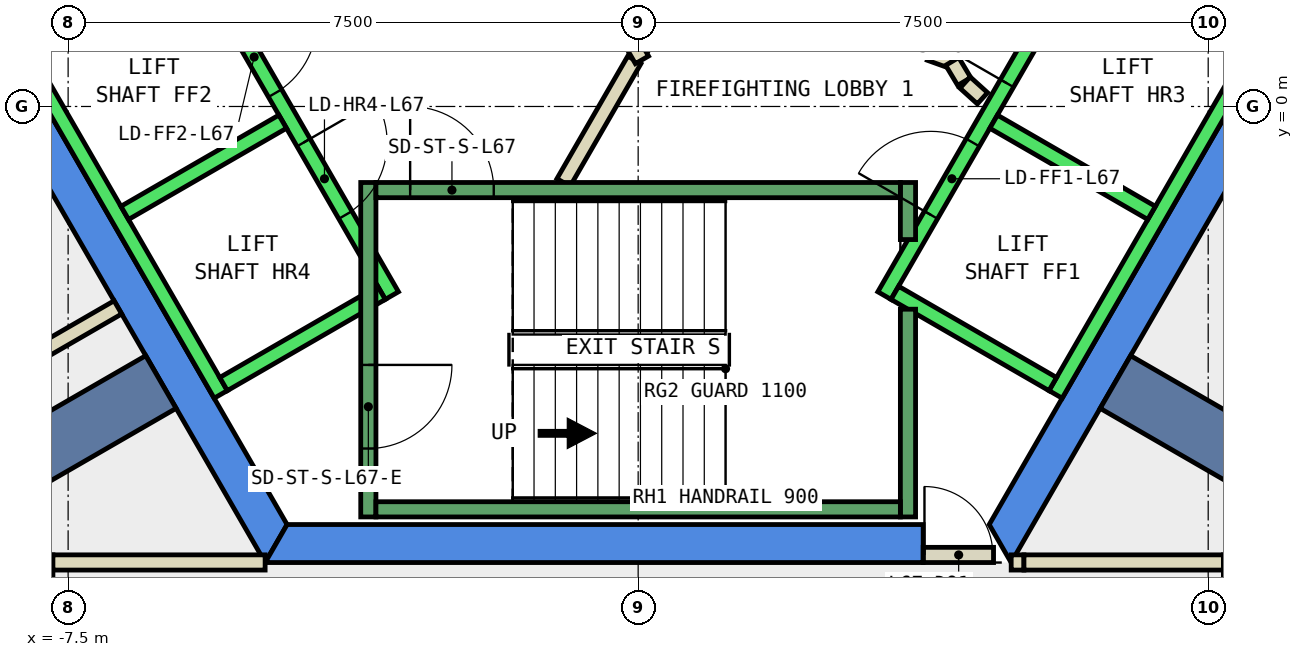
"""IFC4 building model, lengths in metres.
Left out: names, types, materials, properties, quantities, classifications, styles, units other than length and angle.
Written with IfcOpenShell. Run it as: python <this file> out.ifc"""

import sys

from ifc_helpers import new_model, si_unit, direction, frame, frame_2d, origin, place, context, subcontext, project, spatial, polyline, rectangle, outline, extrude, element, fill, save


model = new_model("IFC4")
c1 = context("Model", 3, precision=1e-05, world=origin(), true_north=direction((0.0, 1.0)))
c2 = subcontext(c1, "Body", "Model", "MODEL_VIEW")
j1 = project(units=[si_unit("LENGTHUNIT", "METRE"), si_unit("PLANEANGLEUNIT", "RADIAN")], contexts=[c1])
p1 = place(None, origin())
s1 = spatial("IfcSite", under=j1, at=p1, CompositionType="ELEMENT")
p2 = place(p1, origin())
s2 = spatial("IfcBuilding", under=s1, at=p2, CompositionType="ELEMENT")
p3 = place(p2, frame((0.0, 0.0, 290.0)))
s3 = spatial("IfcBuildingStorey", under=s2, at=p3, CompositionType="ELEMENT", Elevation=290.0)
p4 = place(p3, frame((0.0, 0.0, -0.34)))
e1 = element("IfcWall", 1, at=p4, inside=s3, PredefinedType="SHEAR", context=c2, shape_type="SweptSolid", body=[
    extrude(outline(polyline([(-9.815, 2.5), (-4.907, -6.0), (-4.619, -5.5), (-9.238, 2.5), (-9.815, 2.5)])), origin(), (0.0, 0.0, 1.0), 3.6),
])
p5 = place(p3, frame((0.0, 0.0, -0.34)))
e2 = element("IfcWall", 2, at=p5, inside=s3, PredefinedType="SHEAR", context=c2, shape_type="SweptSolid", body=[
    extrude(outline(polyline([(3.75, -6.0), (3.75, -5.5), (-4.619, -5.5), (-4.907, -6.0), (3.75, -6.0)])), origin(), (0.0, 0.0, 1.0), 3.6),
])
p6 = place(p3, frame((0.0, 0.0, -0.34)))
e3 = element("IfcWall", 3, at=p6, inside=s3, PredefinedType="SHEAR", context=c2, shape_type="SweptSolid", body=[
    extrude(outline(polyline([(4.907, -6.0), (9.815, 2.5), (9.238, 2.5), (4.619, -5.5), (4.907, -6.0)])), origin(), (0.0, 0.0, 1.0), 3.6),
])
for number, where, z_axis, x_axis in (
    (4, (6.279, -3.625, -0.34), (0.0, 0.0, 1.0), (0.866, -0.5, 0.0)),
    (5, (-6.279, -3.625, -0.34), (0.0, 0.0, 1.0), (-0.866, -0.5, 0.0)),
):
    element("IfcWall", number, at=place(p3, frame(where, z_axis=z_axis, x_axis=x_axis)), inside=s3, PredefinedType="SHEAR", context=c2, shape_type="SweptSolid", body=[
        extrude(rectangle(XDim=9.0, YDim=0.8, at=frame_2d((4.5, 0.0))), origin(), (0.0, 0.0, 1.0), 3.6),
    ])
p7 = place(p3, frame((-0.982, -1.0, 0.0), z_axis=(0.0, 0.0, 1.0), x_axis=(0.50024047865, 0.865886518847, 0.0)))
e6 = element("IfcWall", 6, at=p7, inside=s3, PredefinedType="PARTITIONING", context=c2, shape_type="SweptSolid", body=[
    extrude(rectangle(XDim=1.863, YDim=0.2, at=frame_2d((0.931, 0.0))), origin(), (0.0, 0.0, 1.0), 3.26),
])
p8 = place(p3, frame((3.838, 0.702, 0.0), z_axis=(0.0, 0.0, 1.0), x_axis=(0.941035081519, -0.338308993895, 0.0)))
e7 = element("IfcWall", 7, at=p8, inside=s3, PredefinedType="PARTITIONING", context=c2, shape_type="SweptSolid", body=[
    extrude(rectangle(XDim=0.337, YDim=0.2, at=frame_2d((0.168, 0.0))), origin(), (0.0, 0.0, 1.0), 3.26),
])
p9 = place(p3, frame((4.132, 0.593, 0.0), z_axis=(0.0, 0.0, 1.0), x_axis=(0.513561617048, -0.858052717201, 0.0)))
e8 = element("IfcWall", 8, at=p9, inside=s3, PredefinedType="PARTITIONING", context=c2, shape_type="SweptSolid", body=[
    extrude(rectangle(XDim=0.308, YDim=0.2, at=frame_2d((0.154, 0.0))), origin(), (0.0, 0.0, 1.0), 3.26),
])
p10 = place(p3, frame((4.301, 0.315, 0.0), z_axis=(0.0, 0.0, 1.0), x_axis=(0.741798017506, -0.670623367639, 0.0)))
e9 = element("IfcWall", 9, at=p10, inside=s3, PredefinedType="PARTITIONING", context=c2, shape_type="SweptSolid", body=[
    extrude(rectangle(XDim=0.309, YDim=0.2, at=frame_2d((0.154, 0.0))), origin(), (0.0, 0.0, 1.0), 3.26),
])
p11 = place(p3, frame((-2.54, 5.1, 0.0), z_axis=(0.0, 0.0, 1.0), x_axis=(0.499925051871, -0.866068670783, 0.0)))
e10 = element("IfcWall", 10, at=p11, inside=s3, PredefinedType="PARTITIONING", context=c2, shape_type="SweptSolid", body=[
    extrude(rectangle(XDim=5.181, YDim=0.2, at=frame_2d((2.59, 0.0))), origin(), (0.0, 0.0, 1.0), 3.26),
])
p12 = place(p11, frame((2.04, 0.0, 0.0)))
e11 = element("IfcOpeningElement", 11, at=p12, cuts=e10, PredefinedType="OPENING", context=c2, shape_type="SweptSolid", body=[
    extrude(rectangle(XDim=1.0, YDim=2.1, at=frame_2d((0.5, 1.05))), frame((0.0, 0.11, 0.0), z_axis=(0.0, -1.0, 0.0), x_axis=(1.0, 0.0, 0.0)), (0.0, 0.0, 1.0), 0.22),
])
p13 = place(p3, frame((4.908, -5.999, 0.0), z_axis=(0.0, 0.0, 1.0), x_axis=(1.0, 0.0, 0.0)))
e12 = element("IfcWall", 12, at=p13, inside=s3, PredefinedType="PARTITIONING", context=c2, shape_type="SweptSolid", body=[
    extrude(rectangle(XDim=0.168, YDim=0.2, at=frame_2d((0.084, 0.0))), origin(), (0.0, 0.0, 1.0), 2.4),
])
p14 = place(p3, frame((7.8, -5.899, 0.0), z_axis=(0.0, 0.0, 1.0), x_axis=(0.0, -1.0, 0.0)))
e13 = element("IfcWall", 13, at=p14, inside=s3, PredefinedType="PARTITIONING", context=c2, shape_type="SweptSolid", body=[
    extrude(rectangle(XDim=3.876, YDim=0.2, at=frame_2d((1.938, 0.0))), origin(), (0.0, 0.0, 1.0), 3.26),
])
p15 = place(p3, frame((-7.8, -9.775, 0.0), z_axis=(0.0, 0.0, 1.0), x_axis=(0.0, 1.0, 0.0)))
e14 = element("IfcWall", 14, at=p15, inside=s3, PredefinedType="PARTITIONING", context=c2, shape_type="SweptSolid", body=[
    extrude(rectangle(XDim=3.876, YDim=0.2, at=frame_2d((1.938, 0.0))), origin(), (0.0, 0.0, 1.0), 3.26),
])
p16 = place(p15, frame((1.438, 0.0, 0.0)))
e15 = element("IfcOpeningElement", 15, at=p16, cuts=e14, PredefinedType="OPENING", context=c2, shape_type="SweptSolid", body=[
    extrude(rectangle(XDim=1.0, YDim=2.1, at=frame_2d((0.5, 1.05))), frame((0.0, 0.11, 0.0), z_axis=(0.0, -1.0, 0.0), x_axis=(1.0, 0.0, 0.0)), (0.0, 0.0, 1.0), 0.22),
])
p17 = place(p3, frame((-7.7, -5.999, 0.0), z_axis=(0.0, 0.0, 1.0), x_axis=(1.0, 0.0, 0.0)))
e16 = element("IfcWall", 16, at=p17, inside=s3, PredefinedType="PARTITIONING", context=c2, shape_type="SweptSolid", body=[
    extrude(rectangle(XDim=2.792, YDim=0.2, at=frame_2d((1.396, 0.0))), origin(), (0.0, 0.0, 1.0), 3.26),
])
p18 = place(p3, frame((-6.845, -2.643, 0.0), z_axis=(0.0, 0.0, 1.0), x_axis=(-0.865994457699, -0.500053596362, 0.0)))
e17 = element("IfcWall", 17, at=p18, inside=s3, PredefinedType="PARTITIONING", context=c2, shape_type="SweptSolid", body=[
    extrude(rectangle(XDim=6.701, YDim=0.2, at=frame_2d((3.351, 0.0))), origin(), (0.0, 0.0, 1.0), 3.26),
])
p19 = place(p3, frame((3.75, -5.9, 0.0), z_axis=(0.0, 0.0, 1.0), x_axis=(1.0, 0.0, 0.0)))
e18 = element("IfcWall", 18, at=p19, inside=s3, PredefinedType="PARTITIONING", context=c2, shape_type="SweptSolid", body=[
    extrude(rectangle(XDim=0.926, YDim=0.2, at=frame_2d((0.463, 0.0))), origin(), (0.0, 0.0, 1.0), 2.4),
])
p20 = place(p19, frame((0.017, 0.0, 0.0)))
e19 = element("IfcOpeningElement", 19, at=p20, cuts=e18, PredefinedType="OPENING", context=c2, shape_type="SweptSolid", body=[
    extrude(rectangle(XDim=0.9, YDim=2.1, at=frame_2d((0.45, 1.05))), frame((0.0, 0.11, 0.0), z_axis=(0.0, -1.0, 0.0), x_axis=(1.0, 0.0, 0.0)), (0.0, 0.0, 1.0), 0.22),
])
p21 = place(p3, frame((5.076, -5.999, 0.0), z_axis=(0.0, 0.0, 1.0), x_axis=(1.0, 0.0, 0.0)))
e20 = element("IfcWall", 20, at=p21, inside=s3, PredefinedType="PARTITIONING", context=c2, shape_type="SweptSolid", body=[
    extrude(rectangle(XDim=2.624, YDim=0.2, at=frame_2d((1.312, 0.0))), origin(), (0.0, 0.0, 1.0), 3.26),
])
p22 = place(p3, frame((-5.94, 2.188, 0.0), z_axis=(0.0, 0.0, 1.0), x_axis=(0.500034260056, -0.866005622828, 0.0)))
e21 = element("IfcWall", 21, at=p22, inside=s3, PredefinedType="STANDARD", context=c2, shape_type="SweptSolid", body=[
    extrude(rectangle(XDim=5.399, YDim=0.2, at=frame_2d((2.7, 0.0))), origin(), (0.0, 0.0, 1.0), 3.26),
])
p23 = place(p22, frame((3.075, 0.0, 0.0)))
e22 = element("IfcOpeningElement", 22, at=p23, cuts=e21, PredefinedType="OPENING", context=c2, shape_type="SweptSolid", body=[
    extrude(rectangle(XDim=1.1, YDim=2.1, at=frame_2d((0.55, 1.05))), frame((0.0, 0.11, 0.0), z_axis=(0.0, -1.0, 0.0), x_axis=(1.0, 0.0, 0.0)), (0.0, 0.0, 1.0), 0.22),
])
p24 = place(p22, frame((1.225, 0.0, 0.0)))
e23 = element("IfcOpeningElement", 23, at=p24, cuts=e21, PredefinedType="OPENING", context=c2, shape_type="SweptSolid", body=[
    extrude(rectangle(XDim=1.1, YDim=2.1, at=frame_2d((0.55, 1.05))), frame((0.0, 0.11, 0.0), z_axis=(0.0, -1.0, 0.0), x_axis=(1.0, 0.0, 0.0)), (0.0, 0.0, 1.0), 0.22),
])
p25 = place(p3, frame((-8.192, 0.888, 0.0), z_axis=(0.0, 0.0, 1.0), x_axis=(0.500034260056, -0.866005622828, 0.0)))
e24 = element("IfcWall", 24, at=p25, inside=s3, PredefinedType="STANDARD", context=c2, shape_type="SweptSolid", body=[
    extrude(rectangle(XDim=5.399, YDim=0.2, at=frame_2d((2.7, 0.0))), origin(), (0.0, 0.0, 1.0), 3.26),
])
p26 = place(p3, frame((-4.677, -0.2, 0.0), z_axis=(0.0, 0.0, 1.0), x_axis=(-0.865973769406, -0.500089422704, 0.0)))
e25 = element("IfcWall", 25, at=p26, inside=s3, PredefinedType="STANDARD", context=c2, shape_type="SweptSolid", body=[
    extrude(rectangle(XDim=2.399, YDim=0.2, at=frame_2d((1.2, 0.0))), origin(), (0.0, 0.0, 1.0), 3.26),
])
p27 = place(p3, frame((-3.377, -2.452, 0.0), z_axis=(0.0, 0.0, 1.0), x_axis=(-0.865955154139, -0.50012165622, 0.0)))
e26 = element("IfcWall", 26, at=p27, inside=s3, PredefinedType="STANDARD", context=c2, shape_type="SweptSolid", body=[
    extrude(rectangle(XDim=2.4, YDim=0.2, at=frame_2d((1.2, 0.0))), origin(), (0.0, 0.0, 1.0), 3.26),
])
p28 = place(p3, frame((3.24, -2.488, 0.0), z_axis=(0.0, 0.0, 1.0), x_axis=(0.500034260056, 0.866005622828, 0.0)))
e27 = element("IfcWall", 27, at=p28, inside=s3, PredefinedType="STANDARD", context=c2, shape_type="SweptSolid", body=[
    extrude(rectangle(XDim=5.399, YDim=0.2, at=frame_2d((2.7, 0.0))), origin(), (0.0, 0.0, 1.0), 3.26),
])
p29 = place(p28, frame((3.225, 0.0, 0.0)))
e28 = element("IfcOpeningElement", 28, at=p29, cuts=e27, PredefinedType="OPENING", context=c2, shape_type="SweptSolid", body=[
    extrude(rectangle(XDim=1.1, YDim=2.1, at=frame_2d((0.55, 1.05))), frame((0.0, 0.11, 0.0), z_axis=(0.0, -1.0, 0.0), x_axis=(1.0, 0.0, 0.0)), (0.0, 0.0, 1.0), 0.22),
])
p30 = place(p28, frame((1.225, 0.0, 0.0)))
e29 = element("IfcOpeningElement", 29, at=p30, cuts=e27, PredefinedType="OPENING", context=c2, shape_type="SweptSolid", body=[
    extrude(rectangle(XDim=1.1, YDim=2.1, at=frame_2d((0.55, 1.05))), frame((0.0, 0.11, 0.0), z_axis=(0.0, -1.0, 0.0), x_axis=(1.0, 0.0, 0.0)), (0.0, 0.0, 1.0), 0.22),
])
p31 = place(p3, frame((5.492, -3.788, 0.0), z_axis=(0.0, 0.0, 1.0), x_axis=(0.500034260056, 0.866005622828, 0.0)))
e30 = element("IfcWall", 30, at=p31, inside=s3, PredefinedType="STANDARD", context=c2, shape_type="SweptSolid", body=[
    extrude(rectangle(XDim=5.399, YDim=0.2, at=frame_2d((2.7, 0.0))), origin(), (0.0, 0.0, 1.0), 3.26),
])
p32 = place(p3, frame((3.377, -2.452, 0.0), z_axis=(0.0, 0.0, 1.0), x_axis=(0.865955154139, -0.50012165622, 0.0)))
e31 = element("IfcWall", 31, at=p32, inside=s3, PredefinedType="STANDARD", context=c2, shape_type="SweptSolid", body=[
    extrude(rectangle(XDim=2.4, YDim=0.2, at=frame_2d((1.2, 0.0))), origin(), (0.0, 0.0, 1.0), 3.26),
])
p33 = place(p3, frame((4.677, -0.2, 0.0), z_axis=(0.0, 0.0, 1.0), x_axis=(0.865973769406, -0.500089422704, 0.0)))
e32 = element("IfcWall", 32, at=p33, inside=s3, PredefinedType="STANDARD", context=c2, shape_type="SweptSolid", body=[
    extrude(rectangle(XDim=2.399, YDim=0.2, at=frame_2d((1.2, 0.0))), origin(), (0.0, 0.0, 1.0), 3.26),
])
p34 = place(p3, frame((-3.55, -1.0, 0.0), z_axis=(0.0, 0.0, 1.0), x_axis=(0.0, -1.0, 0.0)))
e33 = element("IfcWall", 33, at=p34, inside=s3, PredefinedType="STANDARD", context=c2, shape_type="SweptSolid", body=[
    extrude(rectangle(XDim=4.4, YDim=0.2, at=frame_2d((2.2, 0.0))), origin(), (0.0, 0.0, 1.0), 3.26),
])
p35 = place(p34, frame((2.4, 0.0, 0.0)))
e34 = element("IfcOpeningElement", 34, at=p35, cuts=e33, PredefinedType="OPENING", context=c2, shape_type="SweptSolid", body=[
    extrude(rectangle(XDim=1.1, YDim=2.2, at=frame_2d((0.55, 1.1))), frame((0.0, 0.11, 0.0), z_axis=(0.0, -1.0, 0.0), x_axis=(1.0, 0.0, 0.0)), (0.0, 0.0, 1.0), 0.22),
])
p36 = place(p3, frame((3.55, -2.667, 0.0), z_axis=(0.0, 0.0, 1.0), x_axis=(0.0, -1.0, 0.0)))
e35 = element("IfcWall", 35, at=p36, inside=s3, PredefinedType="STANDARD", context=c2, shape_type="SweptSolid", body=[
    extrude(rectangle(XDim=2.733, YDim=0.2, at=frame_2d((1.366, 0.0))), origin(), (0.0, 0.0, 1.0), 3.26),
])
p37 = place(p3, frame((3.55, -1.0, 0.0), z_axis=(0.0, 0.0, 1.0), x_axis=(0.0, -1.0, 0.0)))
e36 = element("IfcWall", 36, at=p37, inside=s3, PredefinedType="STANDARD", context=c2, shape_type="SweptSolid", body=[
    extrude(rectangle(XDim=0.751, YDim=0.2, at=frame_2d((0.375, 0.0))), origin(), (0.0, 0.0, 1.0), 3.26),
])
p38 = place(p3, frame((-3.45, -1.1, 0.0), z_axis=(0.0, 0.0, 1.0), x_axis=(1.0, 0.0, 0.0)))
e37 = element("IfcWall", 37, at=p38, inside=s3, PredefinedType="STANDARD", context=c2, shape_type="SweptSolid", body=[
    extrude(rectangle(XDim=6.9, YDim=0.2, at=frame_2d((3.45, 0.0))), origin(), (0.0, 0.0, 1.0), 3.26),
])
p39 = place(p38, frame((0.45, 0.0, 0.0)))
e38 = element("IfcOpeningElement", 38, at=p39, cuts=e37, PredefinedType="OPENING", context=c2, shape_type="SweptSolid", body=[
    extrude(rectangle(XDim=1.1, YDim=2.2, at=frame_2d((0.55, 1.1))), frame((0.0, 0.11, 0.0), z_axis=(0.0, -1.0, 0.0), x_axis=(1.0, 0.0, 0.0)), (0.0, 0.0, 1.0), 0.22),
])
p40 = place(p3, frame((-3.45, -5.3, 0.0), z_axis=(0.0, 0.0, 1.0), x_axis=(1.0, 0.0, 0.0)))
e39 = element("IfcWall", 39, at=p40, inside=s3, PredefinedType="STANDARD", context=c2, shape_type="SweptSolid", body=[
    extrude(rectangle(XDim=6.9, YDim=0.2, at=frame_2d((3.45, 0.0))), origin(), (0.0, 0.0, 1.0), 3.26),
])
p41 = place(p20, origin())
e40 = element("IfcDoor", 40, at=p41, inside=s3, OperationType="SINGLE_SWING_LEFT", PredefinedType="DOOR", context=c2, shape_type="SweptSolid", body=[
    extrude(rectangle(XDim=0.9, YDim=2.1, at=frame_2d((0.45, 1.05))), frame((0.0, 0.025, 0.0), z_axis=(0.0, -1.0, 0.0), x_axis=(1.0, 0.0, 0.0)), (0.0, 0.0, 1.0), 0.05),
])
fill(e19, e40)
p42 = place(p29, origin())
e41 = element("IfcDoor", 41, at=p42, inside=s3, OperationType="SLIDING_TO_LEFT", PredefinedType="DOOR", context=c2, shape_type="SweptSolid", body=[
    extrude(rectangle(XDim=1.1, YDim=2.1, at=frame_2d((0.55, 1.05))), frame((0.0, 0.025, 0.0), z_axis=(0.0, -1.0, 0.0), x_axis=(1.0, 0.0, 0.0)), (0.0, 0.0, 1.0), 0.05),
])
fill(e28, e41)
p43 = place(p23, origin())
e42 = element("IfcDoor", 42, at=p43, inside=s3, OperationType="SLIDING_TO_LEFT", PredefinedType="DOOR", context=c2, shape_type="SweptSolid", body=[
    extrude(rectangle(XDim=1.1, YDim=2.1, at=frame_2d((0.55, 1.05))), frame((0.0, 0.025, 0.0), z_axis=(0.0, -1.0, 0.0), x_axis=(1.0, 0.0, 0.0)), (0.0, 0.0, 1.0), 0.05),
])
fill(e22, e42)
p44 = place(p30, origin())
e43 = element("IfcDoor", 43, at=p44, inside=s3, OperationType="SLIDING_TO_LEFT", PredefinedType="DOOR", context=c2, shape_type="SweptSolid", body=[
    extrude(rectangle(XDim=1.1, YDim=2.1, at=frame_2d((0.55, 1.05))), frame((0.0, 0.025, 0.0), z_axis=(0.0, -1.0, 0.0), x_axis=(1.0, 0.0, 0.0)), (0.0, 0.0, 1.0), 0.05),
])
fill(e29, e43)
p45 = place(p24, origin())
e44 = element("IfcDoor", 44, at=p45, inside=s3, OperationType="SLIDING_TO_LEFT", PredefinedType="DOOR", context=c2, shape_type="SweptSolid", body=[
    extrude(rectangle(XDim=1.1, YDim=2.1, at=frame_2d((0.55, 1.05))), frame((0.0, 0.025, 0.0), z_axis=(0.0, -1.0, 0.0), x_axis=(1.0, 0.0, 0.0)), (0.0, 0.0, 1.0), 0.05),
])
fill(e23, e44)
p46 = place(p39, origin())
e45 = element("IfcDoor", 45, at=p46, inside=s3, OperationType="SINGLE_SWING_LEFT", PredefinedType="DOOR", context=c2, shape_type="SweptSolid", body=[
    extrude(rectangle(XDim=1.1, YDim=2.2, at=frame_2d((0.55, 1.1))), frame((0.0, 0.025, 0.0), z_axis=(0.0, -1.0, 0.0), x_axis=(1.0, 0.0, 0.0)), (0.0, 0.0, 1.0), 0.05),
])
fill(e38, e45)
p47 = place(p35, origin())
e46 = element("IfcDoor", 46, at=p47, inside=s3, OperationType="SINGLE_SWING_LEFT", PredefinedType="DOOR", context=c2, shape_type="SweptSolid", body=[
    extrude(rectangle(XDim=1.1, YDim=2.2, at=frame_2d((0.55, 1.1))), frame((0.0, 0.025, 0.0), z_axis=(0.0, -1.0, 0.0), x_axis=(1.0, 0.0, 0.0)), (0.0, 0.0, 1.0), 0.05),
])
fill(e34, e46)
save(model, sys.argv[1])
